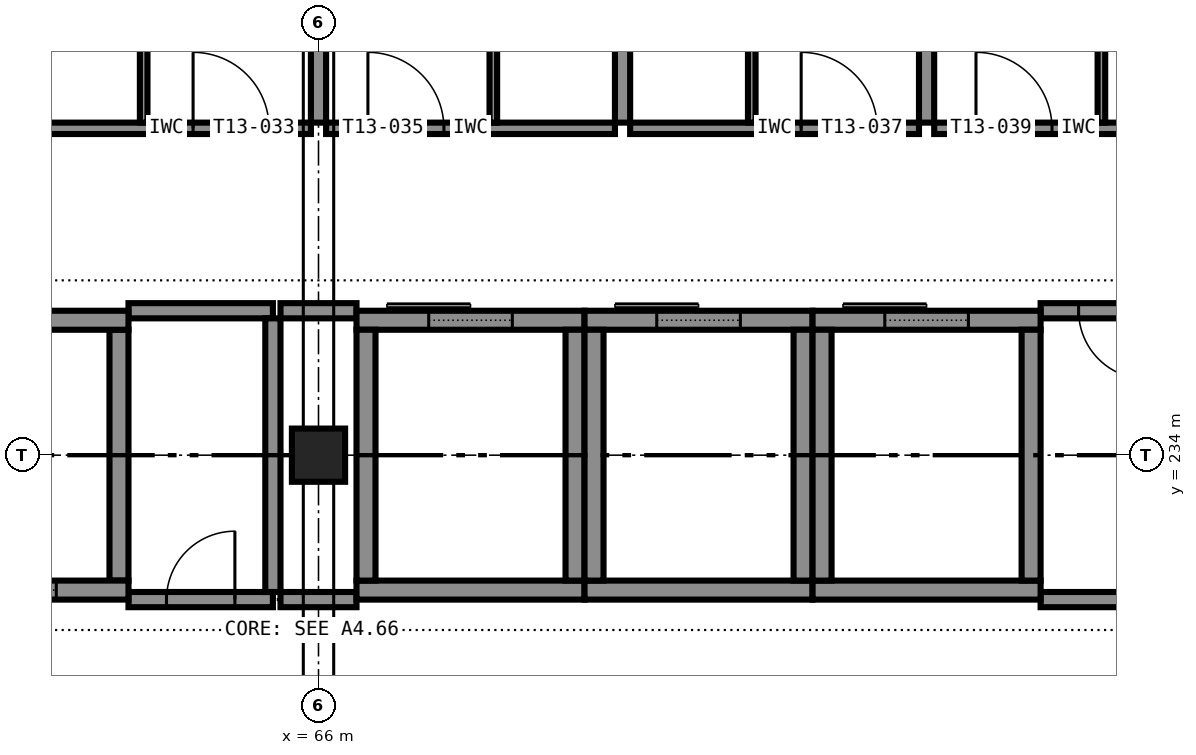
"""IFC4 building model, lengths in metres.
Left out: names, types, materials, properties, quantities, classifications, styles, units other than length and angle.
Written with IfcOpenShell. Run it as: python <this file> out.ifc"""

import sys

from ifc_helpers import new_model, si_unit, direction, frame, frame_2d, origin, origin_2d, place, context, subcontext, project, spatial, rectangle, extrude, element, fill, save


model = new_model("IFC4")
c1 = context("Model", 3, precision=1e-05, world=origin(), true_north=direction((0.0, 1.0)))
c2 = subcontext(c1, "Body", "Model", "MODEL_VIEW")
j1 = project(units=[si_unit("LENGTHUNIT", "METRE"), si_unit("PLANEANGLEUNIT", "RADIAN")], contexts=[c1])
p1 = place(None, origin())
s1 = spatial("IfcSite", under=j1, at=p1, CompositionType="ELEMENT")
p2 = place(p1, origin())
s2 = spatial("IfcBuilding", under=s1, at=p2, CompositionType="ELEMENT")
p3 = place(p2, frame((0.0, 0.0, 53.4)))
s3 = spatial("IfcBuildingStorey", under=s2, at=p3, CompositionType="ELEMENT", Elevation=53.4)
p4 = place(p3, frame((66.0, 234.0, 0.0), z_axis=(0.0, 0.0, 1.0), x_axis=(1.0, 0.0, 0.0)))
e1 = element("IfcColumn", 1, at=p4, inside=s3, PredefinedType="COLUMN", context=c2, shape_type="SweptSolid", body=[
    extrude(rectangle(XDim=0.7, YDim=0.7, at=origin_2d()), origin(), (0.0, 0.0, 1.0), 3.6),
])
p5 = place(p3, frame((60.5, 232.225, 0.0), z_axis=(0.0, 0.0, 1.0), x_axis=(1.0, 0.0, 0.0)))
e2 = element("IfcWall", 2, at=p5, inside=s3, PredefinedType="SHEAR", context=c2, shape_type="SweptSolid", body=[
    extrude(rectangle(XDim=3.0, YDim=0.25, at=frame_2d((1.5, 0.0))), origin(), (0.0, 0.0, 1.0), 3.6),
])
p6 = place(p5, frame((0.95, 0.0, 0.0)))
e3 = element("IfcOpeningElement", 3, at=p6, cuts=e2, PredefinedType="OPENING", context=c2, shape_type="SweptSolid", body=[
    extrude(rectangle(XDim=1.1, YDim=2.1, at=frame_2d((0.55, 1.05))), frame((0.0, 0.135, 0.0), z_axis=(0.0, -1.0, 0.0), x_axis=(1.0, 0.0, 0.0)), (0.0, 0.0, 1.0), 0.27),
])
p7 = place(p3, frame((60.5, 235.775, 0.0), z_axis=(0.0, 0.0, 1.0), x_axis=(1.0, 0.0, 0.0)))
e4 = element("IfcWall", 4, at=p7, inside=s3, PredefinedType="SHEAR", context=c2, shape_type="SweptSolid", body=[
    extrude(rectangle(XDim=3.0, YDim=0.25, at=frame_2d((1.5, 0.0))), origin(), (0.0, 0.0, 1.0), 3.6),
])
p8 = place(p3, frame((63.375, 232.35, 0.0), z_axis=(0.0, 0.0, 1.0), x_axis=(0.0, 1.0, 0.0)))
e5 = element("IfcWall", 5, at=p8, inside=s3, PredefinedType="SHEAR", context=c2, shape_type="SweptSolid", body=[
    extrude(rectangle(XDim=3.3, YDim=0.25, at=frame_2d((1.65, 0.0))), origin(), (0.0, 0.0, 1.0), 3.6),
])
p9 = place(p3, frame((66.5, 232.225, 0.0), z_axis=(0.0, 0.0, 1.0), x_axis=(1.0, 0.0, 0.0)))
e6 = element("IfcWall", 6, at=p9, inside=s3, PredefinedType="SHEAR", context=c2, shape_type="SweptSolid", body=[
    extrude(rectangle(XDim=3.0, YDim=0.25, at=frame_2d((1.5, 0.0))), origin(), (0.0, 0.0, 1.0), 3.6),
])
p10 = place(p3, frame((66.5, 235.775, 0.0), z_axis=(0.0, 0.0, 1.0), x_axis=(1.0, 0.0, 0.0)))
e7 = element("IfcWall", 7, at=p10, inside=s3, PredefinedType="SHEAR", context=c2, shape_type="SweptSolid", body=[
    extrude(rectangle(XDim=3.0, YDim=0.25, at=frame_2d((1.5, 0.0))), origin(), (0.0, 0.0, 1.0), 3.6),
])
p11 = place(p10, frame((0.95, 0.0, 0.0)))
e8 = element("IfcOpeningElement", 8, at=p11, cuts=e7, PredefinedType="OPENING", context=c2, shape_type="SweptSolid", body=[
    extrude(rectangle(XDim=1.1, YDim=2.1, at=frame_2d((0.55, 1.05))), frame((0.0, 0.135, 0.0), z_axis=(0.0, -1.0, 0.0), x_axis=(1.0, 0.0, 0.0)), (0.0, 0.0, 1.0), 0.27),
])
for number, where, z_axis, x_axis in (
    (9, (66.625, 232.35, 0.0), (0.0, 0.0, 1.0), (0.0, 1.0, 0.0)),
    (10, (69.375, 232.35, 0.0), (0.0, 0.0, 1.0), (0.0, 1.0, 0.0)),
):
    element("IfcWall", number, at=place(p3, frame(where, z_axis=z_axis, x_axis=x_axis)), inside=s3, PredefinedType="SHEAR", context=c2, shape_type="SweptSolid", body=[
        extrude(rectangle(XDim=3.3, YDim=0.25, at=frame_2d((1.65, 0.0))), origin(), (0.0, 0.0, 1.0), 3.6),
    ])
p12 = place(p3, frame((69.5, 232.225, 0.0), z_axis=(0.0, 0.0, 1.0), x_axis=(1.0, 0.0, 0.0)))
e11 = element("IfcWall", 11, at=p12, inside=s3, PredefinedType="SHEAR", context=c2, shape_type="SweptSolid", body=[
    extrude(rectangle(XDim=3.0, YDim=0.25, at=frame_2d((1.5, 0.0))), origin(), (0.0, 0.0, 1.0), 3.6),
])
p13 = place(p3, frame((69.5, 235.775, 0.0), z_axis=(0.0, 0.0, 1.0), x_axis=(1.0, 0.0, 0.0)))
e12 = element("IfcWall", 12, at=p13, inside=s3, PredefinedType="SHEAR", context=c2, shape_type="SweptSolid", body=[
    extrude(rectangle(XDim=3.0, YDim=0.25, at=frame_2d((1.5, 0.0))), origin(), (0.0, 0.0, 1.0), 3.6),
])
p14 = place(p13, frame((0.95, 0.0, 0.0)))
e13 = element("IfcOpeningElement", 13, at=p14, cuts=e12, PredefinedType="OPENING", context=c2, shape_type="SweptSolid", body=[
    extrude(rectangle(XDim=1.1, YDim=2.1, at=frame_2d((0.55, 1.05))), frame((0.0, 0.135, 0.0), z_axis=(0.0, -1.0, 0.0), x_axis=(1.0, 0.0, 0.0)), (0.0, 0.0, 1.0), 0.27),
])
for number, where, z_axis, x_axis in (
    (14, (69.625, 232.35, 0.0), (0.0, 0.0, 1.0), (0.0, 1.0, 0.0)),
    (15, (72.375, 232.35, 0.0), (0.0, 0.0, 1.0), (0.0, 1.0, 0.0)),
):
    element("IfcWall", number, at=place(p3, frame(where, z_axis=z_axis, x_axis=x_axis)), inside=s3, PredefinedType="SHEAR", context=c2, shape_type="SweptSolid", body=[
        extrude(rectangle(XDim=3.3, YDim=0.25, at=frame_2d((1.65, 0.0))), origin(), (0.0, 0.0, 1.0), 3.6),
    ])
p15 = place(p3, frame((72.5, 232.225, 0.0), z_axis=(0.0, 0.0, 1.0), x_axis=(1.0, 0.0, 0.0)))
e16 = element("IfcWall", 16, at=p15, inside=s3, PredefinedType="SHEAR", context=c2, shape_type="SweptSolid", body=[
    extrude(rectangle(XDim=3.0, YDim=0.25, at=frame_2d((1.5, 0.0))), origin(), (0.0, 0.0, 1.0), 3.6),
])
p16 = place(p3, frame((72.5, 235.775, 0.0), z_axis=(0.0, 0.0, 1.0), x_axis=(1.0, 0.0, 0.0)))
e17 = element("IfcWall", 17, at=p16, inside=s3, PredefinedType="SHEAR", context=c2, shape_type="SweptSolid", body=[
    extrude(rectangle(XDim=3.0, YDim=0.25, at=frame_2d((1.5, 0.0))), origin(), (0.0, 0.0, 1.0), 3.6),
])
p17 = place(p16, frame((0.95, 0.0, 0.0)))
e18 = element("IfcOpeningElement", 18, at=p17, cuts=e17, PredefinedType="OPENING", context=c2, shape_type="SweptSolid", body=[
    extrude(rectangle(XDim=1.1, YDim=2.1, at=frame_2d((0.55, 1.05))), frame((0.0, 0.135, 0.0), z_axis=(0.0, -1.0, 0.0), x_axis=(1.0, 0.0, 0.0)), (0.0, 0.0, 1.0), 0.27),
])
for number, where, z_axis, x_axis in (
    (19, (72.625, 232.35, 0.0), (0.0, 0.0, 1.0), (0.0, 1.0, 0.0)),
    (20, (75.375, 232.35, 0.0), (0.0, 0.0, 1.0), (0.0, 1.0, 0.0)),
):
    element("IfcWall", number, at=place(p3, frame(where, z_axis=z_axis, x_axis=x_axis)), inside=s3, PredefinedType="SHEAR", context=c2, shape_type="SweptSolid", body=[
        extrude(rectangle(XDim=3.3, YDim=0.25, at=frame_2d((1.65, 0.0))), origin(), (0.0, 0.0, 1.0), 3.6),
    ])
p18 = place(p3, frame((63.5, 232.1, 0.0), z_axis=(0.0, 0.0, 1.0), x_axis=(1.0, 0.0, 0.0)))
e21 = element("IfcWall", 21, at=p18, inside=s3, PredefinedType="PARTITIONING", context=c2, shape_type="SweptSolid", body=[
    extrude(rectangle(XDim=1.9, YDim=0.2, at=frame_2d((0.95, 0.0))), origin(), (0.0, 0.0, 1.0), 3.4),
])
p19 = place(p18, frame((0.5, 0.0, 0.0)))
e22 = element("IfcOpeningElement", 22, at=p19, cuts=e21, PredefinedType="OPENING", context=c2, shape_type="SweptSolid", body=[
    extrude(rectangle(XDim=0.9, YDim=2.1, at=frame_2d((0.45, 1.05))), frame((0.0, 0.11, 0.0), z_axis=(0.0, -1.0, 0.0), x_axis=(1.0, 0.0, 0.0)), (0.0, 0.0, 1.0), 0.22),
])
p20 = place(p3, frame((65.5, 232.1, 0.0), z_axis=(0.0, 0.0, 1.0), x_axis=(1.0, 0.0, 0.0)))
e23 = element("IfcWall", 23, at=p20, inside=s3, PredefinedType="PARTITIONING", context=c2, shape_type="SweptSolid", body=[
    extrude(rectangle(XDim=1.0, YDim=0.2, at=frame_2d((0.5, 0.0))), origin(), (0.0, 0.0, 1.0), 3.4),
])
for number, where, z_axis, x_axis in (
    (24, (75.5, 232.1, 0.0), (0.0, 0.0, 1.0), (1.0, 0.0, 0.0)),
    (25, (63.5, 235.9, 0.0), (0.0, 0.0, 1.0), (1.0, 0.0, 0.0)),
):
    element("IfcWall", number, at=place(p3, frame(where, z_axis=z_axis, x_axis=x_axis)), inside=s3, PredefinedType="PARTITIONING", context=c2, shape_type="SweptSolid", body=[
        extrude(rectangle(XDim=1.9, YDim=0.2, at=frame_2d((0.95, 0.0))), origin(), (0.0, 0.0, 1.0), 3.4),
    ])
p21 = place(p3, frame((65.5, 235.9, 0.0), z_axis=(0.0, 0.0, 1.0), x_axis=(1.0, 0.0, 0.0)))
e26 = element("IfcWall", 26, at=p21, inside=s3, PredefinedType="PARTITIONING", context=c2, shape_type="SweptSolid", body=[
    extrude(rectangle(XDim=1.0, YDim=0.2, at=frame_2d((0.5, 0.0))), origin(), (0.0, 0.0, 1.0), 3.4),
])
p22 = place(p3, frame((77.4, 235.9, 0.0), z_axis=(0.0, 0.0, 1.0), x_axis=(-1.0, 0.0, 0.0)))
e27 = element("IfcWall", 27, at=p22, inside=s3, PredefinedType="PARTITIONING", context=c2, shape_type="SweptSolid", body=[
    extrude(rectangle(XDim=1.9, YDim=0.2, at=frame_2d((0.95, 0.0))), origin(), (0.0, 0.0, 1.0), 3.4),
])
p23 = place(p22, frame((0.5, 0.0, 0.0)))
e28 = element("IfcOpeningElement", 28, at=p23, cuts=e27, PredefinedType="OPENING", context=c2, shape_type="SweptSolid", body=[
    extrude(rectangle(XDim=0.9, YDim=2.1, at=frame_2d((0.45, 1.05))), frame((0.0, 0.11, 0.0), z_axis=(0.0, -1.0, 0.0), x_axis=(1.0, 0.0, 0.0)), (0.0, 0.0, 1.0), 0.22),
])
p24 = place(p3, frame((65.4, 232.2, 0.0), z_axis=(0.0, 0.0, 1.0), x_axis=(0.0, 1.0, 0.0)))
e29 = element("IfcWall", 29, at=p24, inside=s3, PredefinedType="PARTITIONING", context=c2, shape_type="SweptSolid", body=[
    extrude(rectangle(XDim=3.6, YDim=0.2, at=frame_2d((1.8, 0.0))), origin(), (0.0, 0.0, 1.0), 3.4),
])
p25 = place(p3, frame((62.1, 238.3, 0.0), z_axis=(0.0, 0.0, 1.0), x_axis=(1.0, 0.0, 0.0)))
e30 = element("IfcWall", 30, at=p25, inside=s3, PredefinedType="PARTITIONING", context=c2, shape_type="SweptSolid", body=[
    extrude(rectangle(XDim=3.8, YDim=0.15, at=frame_2d((1.9, 0.0))), origin(), (0.0, 0.0, 1.0), 3.4),
])
p26 = place(p25, frame((2.25, 0.0, 0.0)))
e31 = element("IfcOpeningElement", 31, at=p26, cuts=e30, PredefinedType="OPENING", context=c2, shape_type="SweptSolid", body=[
    extrude(rectangle(XDim=1.0, YDim=2.1, at=frame_2d((0.5, 1.05))), frame((0.0, 0.085, 0.0), z_axis=(0.0, -1.0, 0.0), x_axis=(1.0, 0.0, 0.0)), (0.0, 0.0, 1.0), 0.17),
])
p27 = place(p3, frame((63.7, 241.25, 0.0), z_axis=(0.0, 0.0, 1.0), x_axis=(0.0, -1.0, 0.0)))
e32 = element("IfcWall", 32, at=p27, inside=s3, PredefinedType="PARTITIONING", context=c2, shape_type="SweptSolid", body=[
    extrude(rectangle(XDim=2.875, YDim=0.1, at=frame_2d((1.438, 0.0))), origin(), (0.0, 0.0, 1.0), 3.4),
])
p28 = place(p27, frame((1.038, 0.0, 0.0)))
e33 = element("IfcOpeningElement", 33, at=p28, cuts=e32, PredefinedType="OPENING", context=c2, shape_type="SweptSolid", body=[
    extrude(rectangle(XDim=0.8, YDim=2.1, at=frame_2d((0.4, 1.05))), frame((0.0, 0.06, 0.0), z_axis=(0.0, -1.0, 0.0), x_axis=(1.0, 0.0, 0.0)), (0.0, 0.0, 1.0), 0.12),
])
p29 = place(p3, frame((66.1, 238.3, 0.0), z_axis=(0.0, 0.0, 1.0), x_axis=(1.0, 0.0, 0.0)))
e34 = element("IfcWall", 34, at=p29, inside=s3, PredefinedType="PARTITIONING", context=c2, shape_type="SweptSolid", body=[
    extrude(rectangle(XDim=3.8, YDim=0.15, at=frame_2d((1.9, 0.0))), origin(), (0.0, 0.0, 1.0), 3.4),
])
p30 = place(p29, frame((0.55, 0.0, 0.0)))
e35 = element("IfcOpeningElement", 35, at=p30, cuts=e34, PredefinedType="OPENING", context=c2, shape_type="SweptSolid", body=[
    extrude(rectangle(XDim=1.0, YDim=2.1, at=frame_2d((0.5, 1.05))), frame((0.0, 0.085, 0.0), z_axis=(0.0, -1.0, 0.0), x_axis=(1.0, 0.0, 0.0)), (0.0, 0.0, 1.0), 0.17),
])
p31 = place(p3, frame((68.3, 238.375, 0.0), z_axis=(0.0, 0.0, 1.0), x_axis=(0.0, 1.0, 0.0)))
e36 = element("IfcWall", 36, at=p31, inside=s3, PredefinedType="PARTITIONING", context=c2, shape_type="SweptSolid", body=[
    extrude(rectangle(XDim=2.875, YDim=0.1, at=frame_2d((1.438, 0.0))), origin(), (0.0, 0.0, 1.0), 3.4),
])
p32 = place(p31, frame((1.038, 0.0, 0.0)))
e37 = element("IfcOpeningElement", 37, at=p32, cuts=e36, PredefinedType="OPENING", context=c2, shape_type="SweptSolid", body=[
    extrude(rectangle(XDim=0.8, YDim=2.1, at=frame_2d((0.4, 1.05))), frame((0.0, 0.06, 0.0), z_axis=(0.0, -1.0, 0.0), x_axis=(1.0, 0.0, 0.0)), (0.0, 0.0, 1.0), 0.12),
])
p33 = place(p3, frame((70.1, 238.3, 0.0), z_axis=(0.0, 0.0, 1.0), x_axis=(1.0, 0.0, 0.0)))
e38 = element("IfcWall", 38, at=p33, inside=s3, PredefinedType="PARTITIONING", context=c2, shape_type="SweptSolid", body=[
    extrude(rectangle(XDim=3.8, YDim=0.15, at=frame_2d((1.9, 0.0))), origin(), (0.0, 0.0, 1.0), 3.4),
])
p34 = place(p33, frame((2.25, 0.0, 0.0)))
e39 = element("IfcOpeningElement", 39, at=p34, cuts=e38, PredefinedType="OPENING", context=c2, shape_type="SweptSolid", body=[
    extrude(rectangle(XDim=1.0, YDim=2.1, at=frame_2d((0.5, 1.05))), frame((0.0, 0.085, 0.0), z_axis=(0.0, -1.0, 0.0), x_axis=(1.0, 0.0, 0.0)), (0.0, 0.0, 1.0), 0.17),
])
p35 = place(p3, frame((71.7, 241.25, 0.0), z_axis=(0.0, 0.0, 1.0), x_axis=(0.0, -1.0, 0.0)))
e40 = element("IfcWall", 40, at=p35, inside=s3, PredefinedType="PARTITIONING", context=c2, shape_type="SweptSolid", body=[
    extrude(rectangle(XDim=2.875, YDim=0.1, at=frame_2d((1.438, 0.0))), origin(), (0.0, 0.0, 1.0), 3.4),
])
p36 = place(p35, frame((1.038, 0.0, 0.0)))
e41 = element("IfcOpeningElement", 41, at=p36, cuts=e40, PredefinedType="OPENING", context=c2, shape_type="SweptSolid", body=[
    extrude(rectangle(XDim=0.8, YDim=2.1, at=frame_2d((0.4, 1.05))), frame((0.0, 0.06, 0.0), z_axis=(0.0, -1.0, 0.0), x_axis=(1.0, 0.0, 0.0)), (0.0, 0.0, 1.0), 0.12),
])
p37 = place(p3, frame((74.1, 238.3, 0.0), z_axis=(0.0, 0.0, 1.0), x_axis=(1.0, 0.0, 0.0)))
e42 = element("IfcWall", 42, at=p37, inside=s3, PredefinedType="PARTITIONING", context=c2, shape_type="SweptSolid", body=[
    extrude(rectangle(XDim=3.8, YDim=0.15, at=frame_2d((1.9, 0.0))), origin(), (0.0, 0.0, 1.0), 3.4),
])
p38 = place(p37, frame((0.55, 0.0, 0.0)))
e43 = element("IfcOpeningElement", 43, at=p38, cuts=e42, PredefinedType="OPENING", context=c2, shape_type="SweptSolid", body=[
    extrude(rectangle(XDim=1.0, YDim=2.1, at=frame_2d((0.5, 1.05))), frame((0.0, 0.085, 0.0), z_axis=(0.0, -1.0, 0.0), x_axis=(1.0, 0.0, 0.0)), (0.0, 0.0, 1.0), 0.17),
])
p39 = place(p3, frame((76.3, 238.375, 0.0), z_axis=(0.0, 0.0, 1.0), x_axis=(0.0, 1.0, 0.0)))
e44 = element("IfcWall", 44, at=p39, inside=s3, PredefinedType="PARTITIONING", context=c2, shape_type="SweptSolid", body=[
    extrude(rectangle(XDim=2.875, YDim=0.1, at=frame_2d((1.438, 0.0))), origin(), (0.0, 0.0, 1.0), 3.4),
])
p40 = place(p39, frame((1.038, 0.0, 0.0)))
e45 = element("IfcOpeningElement", 45, at=p40, cuts=e44, PredefinedType="OPENING", context=c2, shape_type="SweptSolid", body=[
    extrude(rectangle(XDim=0.8, YDim=2.1, at=frame_2d((0.4, 1.05))), frame((0.0, 0.06, 0.0), z_axis=(0.0, -1.0, 0.0), x_axis=(1.0, 0.0, 0.0)), (0.0, 0.0, 1.0), 0.12),
])
p41 = place(p3, frame((66.0, 245.65, 0.0), z_axis=(0.0, 0.0, 1.0), x_axis=(0.0, -1.0, 0.0)))
e46 = element("IfcWall", 46, at=p41, inside=s3, PredefinedType="PARTITIONING", context=c2, shape_type="SweptSolid", body=[
    extrude(rectangle(XDim=7.275, YDim=0.2, at=frame_2d((3.637, 0.0))), origin(), (0.0, 0.0, 1.0), 2.6),
])
for number, where, z_axis, x_axis in (
    (47, (70.0, 245.7, 0.0), (0.0, 0.0, 1.0), (0.0, -1.0, 0.0)),
    (48, (74.0, 245.7, 0.0), (0.0, 0.0, 1.0), (0.0, -1.0, 0.0)),
):
    element("IfcWall", number, at=place(p3, frame(where, z_axis=z_axis, x_axis=x_axis)), inside=s3, PredefinedType="PARTITIONING", context=c2, shape_type="SweptSolid", body=[
        extrude(rectangle(XDim=7.325, YDim=0.2, at=frame_2d((3.663, 0.0))), origin(), (0.0, 0.0, 1.0), 3.4),
    ])
p42 = place(p19, origin())
e49 = element("IfcDoor", 49, at=p42, inside=s3, OperationType="SINGLE_SWING_RIGHT", PredefinedType="DOOR", context=c2, shape_type="SweptSolid", body=[
    extrude(rectangle(XDim=0.9, YDim=2.1, at=frame_2d((0.45, 1.05))), frame((0.0, 0.025, 0.0), z_axis=(0.0, -1.0, 0.0), x_axis=(1.0, 0.0, 0.0)), (0.0, 0.0, 1.0), 0.05),
])
fill(e22, e49)
p43 = place(p23, origin())
e50 = element("IfcDoor", 50, at=p43, inside=s3, OperationType="SINGLE_SWING_LEFT", PredefinedType="DOOR", context=c2, shape_type="SweptSolid", body=[
    extrude(rectangle(XDim=0.9, YDim=2.1, at=frame_2d((0.45, 1.05))), frame((0.0, 0.025, 0.0), z_axis=(0.0, -1.0, 0.0), x_axis=(1.0, 0.0, 0.0)), (0.0, 0.0, 1.0), 0.05),
])
fill(e28, e50)
p44 = place(p26, origin())
e51 = element("IfcDoor", 51, at=p44, inside=s3, OperationType="SINGLE_SWING_LEFT", PredefinedType="DOOR", context=c2, shape_type="SweptSolid", body=[
    extrude(rectangle(XDim=1.0, YDim=2.1, at=frame_2d((0.5, 1.05))), frame((0.0, 0.025, 0.0), z_axis=(0.0, -1.0, 0.0), x_axis=(1.0, 0.0, 0.0)), (0.0, 0.0, 1.0), 0.05),
])
fill(e31, e51)
p45 = place(p30, origin())
e52 = element("IfcDoor", 52, at=p45, inside=s3, OperationType="SINGLE_SWING_LEFT", PredefinedType="DOOR", context=c2, shape_type="SweptSolid", body=[
    extrude(rectangle(XDim=1.0, YDim=2.1, at=frame_2d((0.5, 1.05))), frame((0.0, 0.025, 0.0), z_axis=(0.0, -1.0, 0.0), x_axis=(1.0, 0.0, 0.0)), (0.0, 0.0, 1.0), 0.05),
])
fill(e35, e52)
p46 = place(p34, origin())
e53 = element("IfcDoor", 53, at=p46, inside=s3, OperationType="SINGLE_SWING_LEFT", PredefinedType="DOOR", context=c2, shape_type="SweptSolid", body=[
    extrude(rectangle(XDim=1.0, YDim=2.1, at=frame_2d((0.5, 1.05))), frame((0.0, 0.025, 0.0), z_axis=(0.0, -1.0, 0.0), x_axis=(1.0, 0.0, 0.0)), (0.0, 0.0, 1.0), 0.05),
])
fill(e39, e53)
p47 = place(p38, origin())
e54 = element("IfcDoor", 54, at=p47, inside=s3, OperationType="SINGLE_SWING_LEFT", PredefinedType="DOOR", context=c2, shape_type="SweptSolid", body=[
    extrude(rectangle(XDim=1.0, YDim=2.1, at=frame_2d((0.5, 1.05))), frame((0.0, 0.025, 0.0), z_axis=(0.0, -1.0, 0.0), x_axis=(1.0, 0.0, 0.0)), (0.0, 0.0, 1.0), 0.05),
])
fill(e43, e54)
p48 = place(p6, origin())
e55 = element("IfcDoor", 55, at=p48, inside=s3, OperationType="SLIDING_TO_LEFT", PredefinedType="DOOR", context=c2, shape_type="SweptSolid", body=[
    extrude(rectangle(XDim=1.1, YDim=2.1, at=frame_2d((0.55, 1.05))), frame((0.0, 0.025, 0.0), z_axis=(0.0, -1.0, 0.0), x_axis=(1.0, 0.0, 0.0)), (0.0, 0.0, 1.0), 0.05),
])
fill(e3, e55)
p49 = place(p11, origin())
e56 = element("IfcDoor", 56, at=p49, inside=s3, OperationType="SLIDING_TO_LEFT", PredefinedType="DOOR", context=c2, shape_type="SweptSolid", body=[
    extrude(rectangle(XDim=1.1, YDim=2.1, at=frame_2d((0.55, 1.05))), frame((0.0, 0.025, 0.0), z_axis=(0.0, -1.0, 0.0), x_axis=(1.0, 0.0, 0.0)), (0.0, 0.0, 1.0), 0.05),
])
fill(e8, e56)
p50 = place(p14, origin())
e57 = element("IfcDoor", 57, at=p50, inside=s3, OperationType="SLIDING_TO_LEFT", PredefinedType="DOOR", context=c2, shape_type="SweptSolid", body=[
    extrude(rectangle(XDim=1.1, YDim=2.1, at=frame_2d((0.55, 1.05))), frame((0.0, 0.025, 0.0), z_axis=(0.0, -1.0, 0.0), x_axis=(1.0, 0.0, 0.0)), (0.0, 0.0, 1.0), 0.05),
])
fill(e13, e57)
p51 = place(p17, origin())
e58 = element("IfcDoor", 58, at=p51, inside=s3, OperationType="SLIDING_TO_LEFT", PredefinedType="DOOR", context=c2, shape_type="SweptSolid", body=[
    extrude(rectangle(XDim=1.1, YDim=2.1, at=frame_2d((0.55, 1.05))), frame((0.0, 0.025, 0.0), z_axis=(0.0, -1.0, 0.0), x_axis=(1.0, 0.0, 0.0)), (0.0, 0.0, 1.0), 0.05),
])
fill(e18, e58)
save(model, sys.argv[1])
